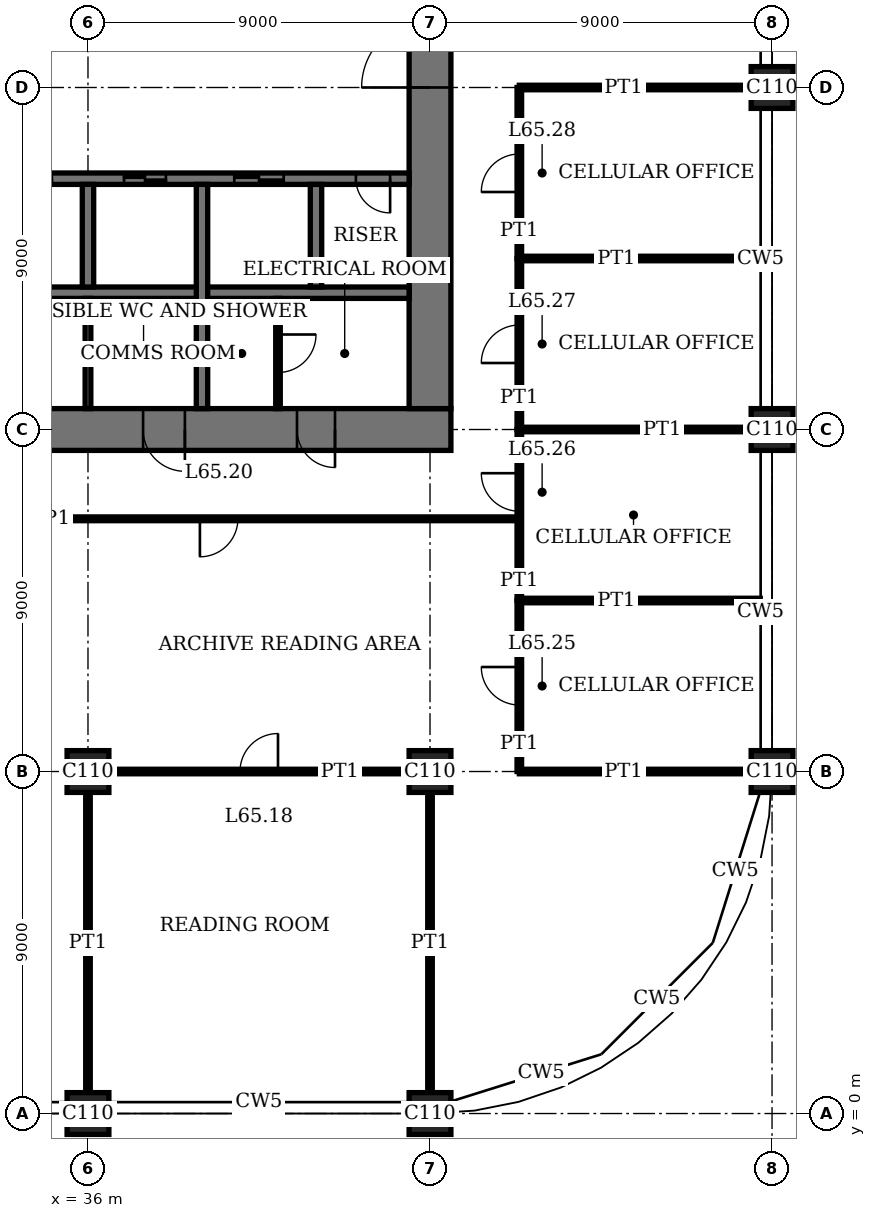
"""IFC4 building model, lengths in metres.
Left out: names, types, materials, properties, quantities, classifications, styles, units other than length and angle.
Written with IfcOpenShell. Run it as: python <this file> out.ifc"""

import sys

from ifc_helpers import new_model, si_unit, direction, frame, frame_2d, origin, origin_2d, place, context, subcontext, project, spatial, rectangle, extrude, element, fill, save


model = new_model("IFC4")
c1 = context("Model", 3, precision=1e-05, world=origin(), true_north=direction((0.0, 1.0)))
c2 = subcontext(c1, "Body", "Model", "MODEL_VIEW")
j1 = project(units=[si_unit("LENGTHUNIT", "METRE"), si_unit("PLANEANGLEUNIT", "RADIAN")], contexts=[c1])
p1 = place(None, origin())
s1 = spatial("IfcSite", under=j1, at=p1, CompositionType="ELEMENT")
p2 = place(p1, origin())
s2 = spatial("IfcBuilding", under=s1, at=p2, CompositionType="ELEMENT")
p3 = place(p2, frame((0.0, 0.0, 267.4)))
s3 = spatial("IfcBuildingStorey", under=s2, at=p3, CompositionType="ELEMENT", Elevation=267.4)
for number, where, z_axis, x_axis in (
    (1, (36.0, 0.0, 0.0), (0.0, 0.0, 1.0), (1.0, 0.0, 0.0)),
    (2, (36.0, 9.0, 0.0), (0.0, 0.0, 1.0), (1.0, 0.0, 0.0)),
    (3, (45.0, 0.0, 0.0), (0.0, 0.0, 1.0), (1.0, 0.0, 0.0)),
    (4, (45.0, 9.0, 0.0), (0.0, 0.0, 1.0), (1.0, 0.0, 0.0)),
    (5, (54.0, 9.0, 0.0), (0.0, 0.0, 1.0), (1.0, 0.0, 0.0)),
    (6, (54.0, 18.0, 0.0), (0.0, 0.0, 1.0), (1.0, 0.0, 0.0)),
    (7, (54.0, 27.0, 0.0), (0.0, 0.0, 1.0), (1.0, 0.0, 0.0)),
):
    element("IfcColumn", number, at=place(p3, frame(where, z_axis=z_axis, x_axis=x_axis)), inside=s3, PredefinedType="COLUMN", context=c2, shape_type="SweptSolid", body=[
        extrude(rectangle(XDim=1.1, YDim=1.1, at=origin_2d()), origin(), (0.0, 0.0, 1.0), 4.0),
    ])
p4 = place(p3, frame((17.45, 18.0, 0.0), z_axis=(0.0, 0.0, 1.0), x_axis=(1.0, 0.0, 0.0)))
e8 = element("IfcWall", 8, at=p4, inside=s3, PredefinedType="SHEAR", context=c2, shape_type="SweptSolid", body=[
    extrude(rectangle(XDim=28.1, YDim=1.1, at=frame_2d((14.05, 0.0))), origin(), (0.0, 0.0, 1.0), 4.0),
])
p5 = place(p4, frame((11.55, 0.0, 0.0)))
e9 = element("IfcOpeningElement", 9, at=p5, cuts=e8, PredefinedType="OPENING", context=c2, shape_type="SweptSolid", body=[
    extrude(rectangle(XDim=1.0, YDim=2.4, at=frame_2d((0.5, 1.2))), frame((0.0, 0.56, 0.0), z_axis=(0.0, -1.0, 0.0), x_axis=(1.0, 0.0, 0.0)), (0.0, 0.0, 1.0), 1.12),
])
p6 = place(p4, frame((16.55, 0.0, 0.0)))
e10 = element("IfcOpeningElement", 10, at=p6, cuts=e8, PredefinedType="OPENING", context=c2, shape_type="SweptSolid", body=[
    extrude(rectangle(XDim=1.0, YDim=2.4, at=frame_2d((0.5, 1.2))), frame((0.0, 0.56, 0.0), z_axis=(0.0, -1.0, 0.0), x_axis=(1.0, 0.0, 0.0)), (0.0, 0.0, 1.0), 1.12),
])
p7 = place(p4, frame((20.0, 0.0, 0.0)))
e11 = element("IfcOpeningElement", 11, at=p7, cuts=e8, PredefinedType="OPENING", context=c2, shape_type="SweptSolid", body=[
    extrude(rectangle(XDim=1.1, YDim=2.4, at=frame_2d((0.55, 1.2))), frame((0.0, 0.56, 0.0), z_axis=(0.0, -1.0, 0.0), x_axis=(1.0, 0.0, 0.0)), (0.0, 0.0, 1.0), 1.12),
])
p8 = place(p4, frame((24.05, 0.0, 0.0)))
e12 = element("IfcOpeningElement", 12, at=p8, cuts=e8, PredefinedType="OPENING", context=c2, shape_type="SweptSolid", body=[
    extrude(rectangle(XDim=1.0, YDim=2.4, at=frame_2d((0.5, 1.2))), frame((0.0, 0.56, 0.0), z_axis=(0.0, -1.0, 0.0), x_axis=(1.0, 0.0, 0.0)), (0.0, 0.0, 1.0), 1.12),
])
p9 = place(p3, frame((45.0, 18.55, 0.0), z_axis=(0.0, 0.0, 1.0), x_axis=(0.0, 1.0, 0.0)))
e13 = element("IfcWall", 13, at=p9, inside=s3, PredefinedType="SHEAR", context=c2, shape_type="SweptSolid", body=[
    extrude(rectangle(XDim=16.9, YDim=1.1, at=frame_2d((8.45, 0.0))), origin(), (0.0, 0.0, 1.0), 4.0),
])
p10 = place(p9, frame((8.45, 0.0, 0.0)))
e14 = element("IfcOpeningElement", 14, at=p10, cuts=e13, PredefinedType="OPENING", context=c2, shape_type="SweptSolid", body=[
    extrude(rectangle(XDim=1.8, YDim=2.4, at=frame_2d((0.9, 1.2))), frame((0.0, 0.56, 0.0), z_axis=(0.0, -1.0, 0.0), x_axis=(1.0, 0.0, 0.0)), (0.0, 0.0, 1.0), 1.12),
])
p11 = place(p3, frame((18.55, 24.6, 0.0), z_axis=(0.0, 0.0, 1.0), x_axis=(1.0, 0.0, 0.0)))
e15 = element("IfcWall", 15, at=p11, inside=s3, PredefinedType="SHEAR", context=c2, shape_type="SweptSolid", body=[
    extrude(rectangle(XDim=25.9, YDim=0.3, at=frame_2d((12.95, 0.0))), origin(), (0.0, 0.0, 1.0), 4.0),
])
p12 = place(p11, frame((4.95, 0.0, 0.0)))
e16 = element("IfcOpeningElement", 16, at=p12, cuts=e15, PredefinedType="OPENING", context=c2, shape_type="SweptSolid", body=[
    extrude(rectangle(XDim=1.0, YDim=2.4, at=frame_2d((0.5, 1.2))), frame((0.0, 0.16, 0.0), z_axis=(0.0, -1.0, 0.0), x_axis=(1.0, 0.0, 0.0)), (0.0, 0.0, 1.0), 0.32),
])
p13 = place(p11, frame((24.5, 0.0, 0.0)))
e17 = element("IfcOpeningElement", 17, at=p13, cuts=e15, PredefinedType="OPENING", context=c2, shape_type="SweptSolid", body=[
    extrude(rectangle(XDim=0.9, YDim=2.1, at=frame_2d((0.45, 1.05))), frame((0.0, 0.16, 0.0), z_axis=(0.0, -1.0, 0.0), x_axis=(1.0, 0.0, 0.0)), (0.0, 0.0, 1.0), 0.32),
])
p14 = place(p11, frame((9.4, 0.0, 0.0)))
e18 = element("IfcOpeningElement", 18, at=p14, cuts=e15, PredefinedType="OPENING", context=c2, shape_type="SweptSolid", body=[
    extrude(rectangle(XDim=1.1, YDim=2.4, at=frame_2d((0.55, 1.2))), frame((0.0, 0.16, 0.0), z_axis=(0.0, -1.0, 0.0), x_axis=(1.0, 0.0, 0.0)), (0.0, 0.0, 1.0), 0.32),
])
p15 = place(p11, frame((12.4, 0.0, 0.0)))
e19 = element("IfcOpeningElement", 19, at=p15, cuts=e15, PredefinedType="OPENING", context=c2, shape_type="SweptSolid", body=[
    extrude(rectangle(XDim=1.1, YDim=2.4, at=frame_2d((0.55, 1.2))), frame((0.0, 0.16, 0.0), z_axis=(0.0, -1.0, 0.0), x_axis=(1.0, 0.0, 0.0)), (0.0, 0.0, 1.0), 0.32),
])
p16 = place(p11, frame((15.4, 0.0, 0.0)))
e20 = element("IfcOpeningElement", 20, at=p16, cuts=e15, PredefinedType="OPENING", context=c2, shape_type="SweptSolid", body=[
    extrude(rectangle(XDim=1.1, YDim=2.4, at=frame_2d((0.55, 1.2))), frame((0.0, 0.16, 0.0), z_axis=(0.0, -1.0, 0.0), x_axis=(1.0, 0.0, 0.0)), (0.0, 0.0, 1.0), 0.32),
])
p17 = place(p11, frame((18.4, 0.0, 0.0)))
e21 = element("IfcOpeningElement", 21, at=p17, cuts=e15, PredefinedType="OPENING", context=c2, shape_type="SweptSolid", body=[
    extrude(rectangle(XDim=1.1, YDim=2.4, at=frame_2d((0.55, 1.2))), frame((0.0, 0.16, 0.0), z_axis=(0.0, -1.0, 0.0), x_axis=(1.0, 0.0, 0.0)), (0.0, 0.0, 1.0), 0.32),
])
p18 = place(p11, frame((21.3, 0.0, 0.0)))
e22 = element("IfcOpeningElement", 22, at=p18, cuts=e15, PredefinedType="OPENING", context=c2, shape_type="SweptSolid", body=[
    extrude(rectangle(XDim=1.3, YDim=2.4, at=frame_2d((0.65, 1.2))), frame((0.0, 0.16, 0.0), z_axis=(0.0, -1.0, 0.0), x_axis=(1.0, 0.0, 0.0)), (0.0, 0.0, 1.0), 0.32),
])
p19 = place(p3, frame((27.15, 21.6, 0.0), z_axis=(0.0, 0.0, 1.0), x_axis=(1.0, 0.0, 0.0)))
e23 = element("IfcWall", 23, at=p19, inside=s3, PredefinedType="SHEAR", context=c2, shape_type="SweptSolid", body=[
    extrude(rectangle(XDim=17.3, YDim=0.3, at=frame_2d((8.65, 0.0))), origin(), (0.0, 0.0, 1.0), 4.0),
])
p20 = place(p3, frame((36.0, 21.75, 0.0), z_axis=(0.0, 0.0, 1.0), x_axis=(0.0, 1.0, 0.0)))
e24 = element("IfcWall", 24, at=p20, inside=s3, PredefinedType="SHEAR", context=c2, shape_type="SweptSolid", body=[
    extrude(rectangle(XDim=2.7, YDim=0.3, at=frame_2d((1.35, 0.0))), origin(), (0.0, 0.0, 1.0), 4.0),
])
p21 = place(p3, frame((39.0, 18.55, 0.0), z_axis=(0.0, 0.0, 1.0), x_axis=(0.0, 1.0, 0.0)))
e25 = element("IfcWall", 25, at=p21, inside=s3, PredefinedType="SHEAR", context=c2, shape_type="SweptSolid", body=[
    extrude(rectangle(XDim=5.9, YDim=0.3, at=frame_2d((2.95, 0.0))), origin(), (0.0, 0.0, 1.0), 4.0),
])
p22 = place(p3, frame((42.0, 21.75, 0.0), z_axis=(0.0, 0.0, 1.0), x_axis=(0.0, 1.0, 0.0)))
e26 = element("IfcWall", 26, at=p22, inside=s3, PredefinedType="SHEAR", context=c2, shape_type="SweptSolid", body=[
    extrude(rectangle(XDim=2.7, YDim=0.3, at=frame_2d((1.35, 0.0))), origin(), (0.0, 0.0, 1.0), 4.0),
])
p23 = place(p3, frame((36.55, 9.0, 0.0), z_axis=(0.0, 0.0, 1.0), x_axis=(1.0, 0.0, 0.0)))
e27 = element("IfcWall", 27, at=p23, inside=s3, PredefinedType="PARTITIONING", context=c2, shape_type="SweptSolid", body=[
    extrude(rectangle(XDim=7.9, YDim=0.12, at=frame_2d((3.95, 0.0))), origin(), (0.0, 0.0, 1.0), 3.05),
])
p24 = place(p23, frame((3.45, 0.0, 0.0)))
e28 = element("IfcOpeningElement", 28, at=p24, cuts=e27, PredefinedType="OPENING", context=c2, shape_type="SweptSolid", body=[
    extrude(rectangle(XDim=1.0, YDim=2.4, at=frame_2d((0.5, 1.2))), frame((0.0, 0.07, 0.0), z_axis=(0.0, -1.0, 0.0), x_axis=(1.0, 0.0, 0.0)), (0.0, 0.0, 1.0), 0.14),
])
p25 = place(p3, frame((47.35, 9.0, 0.0), z_axis=(0.0, 0.0, 1.0), x_axis=(1.0, 0.0, 0.0)))
e29 = element("IfcWall", 29, at=p25, inside=s3, PredefinedType="PARTITIONING", context=c2, shape_type="SweptSolid", body=[
    extrude(rectangle(XDim=6.1, YDim=0.12, at=frame_2d((3.05, 0.0))), origin(), (0.0, 0.0, 1.0), 3.05),
])
p26 = place(p3, frame((47.35, 13.5, 0.0), z_axis=(0.0, 0.0, 1.0), x_axis=(1.0, 0.0, 0.0)))
e30 = element("IfcWall", 30, at=p26, inside=s3, PredefinedType="PARTITIONING", context=c2, shape_type="SweptSolid", body=[
    extrude(rectangle(XDim=6.34, YDim=0.12, at=frame_2d((3.17, 0.0))), origin(), (0.0, 0.0, 1.0), 3.1),
])
p27 = place(p3, frame((31.55, 15.65, 0.0), z_axis=(0.0, 0.0, 1.0), x_axis=(1.0, 0.0, 0.0)))
e31 = element("IfcWall", 31, at=p27, inside=s3, PredefinedType="PARTITIONING", context=c2, shape_type="SweptSolid", body=[
    extrude(rectangle(XDim=15.79, YDim=0.1, at=frame_2d((7.895, 0.0))), origin(), (0.0, 0.0, 1.0), 3.75),
])
p28 = place(p27, frame((7.395, 0.0, 0.0)))
e32 = element("IfcOpeningElement", 32, at=p28, cuts=e31, PredefinedType="OPENING", context=c2, shape_type="SweptSolid", body=[
    extrude(rectangle(XDim=1.0, YDim=2.4, at=frame_2d((0.5, 1.2))), frame((0.0, 0.06, 0.0), z_axis=(0.0, -1.0, 0.0), x_axis=(1.0, 0.0, 0.0)), (0.0, 0.0, 1.0), 0.12),
])
p29 = place(p3, frame((47.35, 18.0, 0.0), z_axis=(0.0, 0.0, 1.0), x_axis=(1.0, 0.0, 0.0)))
e33 = element("IfcWall", 33, at=p29, inside=s3, PredefinedType="PARTITIONING", context=c2, shape_type="SweptSolid", body=[
    extrude(rectangle(XDim=6.1, YDim=0.12, at=frame_2d((3.05, 0.0))), origin(), (0.0, 0.0, 1.0), 3.05),
])
p30 = place(p3, frame((47.35, 22.5, 0.0), z_axis=(0.0, 0.0, 1.0), x_axis=(1.0, 0.0, 0.0)))
e34 = element("IfcWall", 34, at=p30, inside=s3, PredefinedType="PARTITIONING", context=c2, shape_type="SweptSolid", body=[
    extrude(rectangle(XDim=6.34, YDim=0.12, at=frame_2d((3.17, 0.0))), origin(), (0.0, 0.0, 1.0), 3.1),
])
p31 = place(p3, frame((47.35, 27.0, 0.0), z_axis=(0.0, 0.0, 1.0), x_axis=(1.0, 0.0, 0.0)))
e35 = element("IfcWall", 35, at=p31, inside=s3, PredefinedType="PARTITIONING", context=c2, shape_type="SweptSolid", body=[
    extrude(rectangle(XDim=6.1, YDim=0.12, at=frame_2d((3.05, 0.0))), origin(), (0.0, 0.0, 1.0), 3.05),
])
for number, where, z_axis, x_axis in (
    (36, (36.0, 0.55, 0.0), (0.0, 0.0, 1.0), (0.0, 1.0, 0.0)),
    (37, (45.0, 0.55, 0.0), (0.0, 0.0, 1.0), (0.0, 1.0, 0.0)),
):
    element("IfcWall", number, at=place(p3, frame(where, z_axis=z_axis, x_axis=x_axis)), inside=s3, PredefinedType="PARTITIONING", context=c2, shape_type="SweptSolid", body=[
        extrude(rectangle(XDim=7.9, YDim=0.12, at=frame_2d((3.95, 0.0))), origin(), (0.0, 0.0, 1.0), 3.05),
    ])
p32 = place(p3, frame((47.35, 9.0, 0.0), z_axis=(0.0, 0.0, 1.0), x_axis=(0.0, 1.0, 0.0)))
e38 = element("IfcWall", 38, at=p32, inside=s3, PredefinedType="PARTITIONING", context=c2, shape_type="SweptSolid", body=[
    extrude(rectangle(XDim=4.5, YDim=0.12, at=frame_2d((2.25, 0.0))), origin(), (0.0, 0.0, 1.0), 3.75),
])
p33 = place(p32, frame((1.75, 0.0, 0.0)))
e39 = element("IfcOpeningElement", 39, at=p33, cuts=e38, PredefinedType="OPENING", context=c2, shape_type="SweptSolid", body=[
    extrude(rectangle(XDim=1.0, YDim=2.4, at=frame_2d((0.5, 1.2))), frame((0.0, 0.07, 0.0), z_axis=(0.0, -1.0, 0.0), x_axis=(1.0, 0.0, 0.0)), (0.0, 0.0, 1.0), 0.14),
])
p34 = place(p3, frame((47.35, 13.5, 0.0), z_axis=(0.0, 0.0, 1.0), x_axis=(0.0, 1.0, 0.0)))
e40 = element("IfcWall", 40, at=p34, inside=s3, PredefinedType="PARTITIONING", context=c2, shape_type="SweptSolid", body=[
    extrude(rectangle(XDim=4.5, YDim=0.12, at=frame_2d((2.25, 0.0))), origin(), (0.0, 0.0, 1.0), 3.75),
])
p35 = place(p34, frame((2.35, 0.0, 0.0)))
e41 = element("IfcOpeningElement", 41, at=p35, cuts=e40, PredefinedType="OPENING", context=c2, shape_type="SweptSolid", body=[
    extrude(rectangle(XDim=1.0, YDim=2.4, at=frame_2d((0.5, 1.2))), frame((0.0, 0.07, 0.0), z_axis=(0.0, -1.0, 0.0), x_axis=(1.0, 0.0, 0.0)), (0.0, 0.0, 1.0), 0.14),
])
p36 = place(p3, frame((47.35, 18.0, 0.0), z_axis=(0.0, 0.0, 1.0), x_axis=(0.0, 1.0, 0.0)))
e42 = element("IfcWall", 42, at=p36, inside=s3, PredefinedType="PARTITIONING", context=c2, shape_type="SweptSolid", body=[
    extrude(rectangle(XDim=4.5, YDim=0.12, at=frame_2d((2.25, 0.0))), origin(), (0.0, 0.0, 1.0), 3.75),
])
p37 = place(p36, frame((1.75, 0.0, 0.0)))
e43 = element("IfcOpeningElement", 43, at=p37, cuts=e42, PredefinedType="OPENING", context=c2, shape_type="SweptSolid", body=[
    extrude(rectangle(XDim=1.0, YDim=2.4, at=frame_2d((0.5, 1.2))), frame((0.0, 0.07, 0.0), z_axis=(0.0, -1.0, 0.0), x_axis=(1.0, 0.0, 0.0)), (0.0, 0.0, 1.0), 0.14),
])
p38 = place(p3, frame((47.35, 22.5, 0.0), z_axis=(0.0, 0.0, 1.0), x_axis=(0.0, 1.0, 0.0)))
e44 = element("IfcWall", 44, at=p38, inside=s3, PredefinedType="PARTITIONING", context=c2, shape_type="SweptSolid", body=[
    extrude(rectangle(XDim=4.5, YDim=0.12, at=frame_2d((2.25, 0.0))), origin(), (0.0, 0.0, 1.0), 3.75),
])
p39 = place(p38, frame((1.75, 0.0, 0.0)))
e45 = element("IfcOpeningElement", 45, at=p39, cuts=e44, PredefinedType="OPENING", context=c2, shape_type="SweptSolid", body=[
    extrude(rectangle(XDim=1.0, YDim=2.4, at=frame_2d((0.5, 1.2))), frame((0.0, 0.07, 0.0), z_axis=(0.0, -1.0, 0.0), x_axis=(1.0, 0.0, 0.0)), (0.0, 0.0, 1.0), 0.14),
])
p40 = place(p3, frame((36.0, 18.55, 0.0), z_axis=(0.0, 0.0, 1.0), x_axis=(0.0, 1.0, 0.0)))
e46 = element("IfcWall", 46, at=p40, inside=s3, PredefinedType="PARTITIONING", context=c2, shape_type="SweptSolid", body=[
    extrude(rectangle(XDim=2.9, YDim=0.15, at=frame_2d((1.45, 0.0))), origin(), (0.0, 0.0, 1.0), 3.75),
])
p41 = place(p3, frame((41.0, 18.55, 0.0), z_axis=(0.0, 0.0, 1.0), x_axis=(0.0, 1.0, 0.0)))
e47 = element("IfcWall", 47, at=p41, inside=s3, PredefinedType="PARTITIONING", context=c2, shape_type="SweptSolid", body=[
    extrude(rectangle(XDim=2.9, YDim=0.12, at=frame_2d((1.45, 0.0))), origin(), (0.0, 0.0, 1.0), 3.75),
])
p42 = place(p41, frame((0.95, 0.0, 0.0)))
e48 = element("IfcOpeningElement", 48, at=p42, cuts=e47, PredefinedType="OPENING", context=c2, shape_type="SweptSolid", body=[
    extrude(rectangle(XDim=1.0, YDim=2.4, at=frame_2d((0.5, 1.2))), frame((0.0, 0.07, 0.0), z_axis=(0.0, -1.0, 0.0), x_axis=(1.0, 0.0, 0.0)), (0.0, 0.0, 1.0), 0.14),
])
p43 = place(p10, origin())
e49 = element("IfcDoor", 49, at=p43, inside=s3, OperationType="DOUBLE_DOOR_DOUBLE_SWING", PredefinedType="DOOR", context=c2, shape_type="SweptSolid", body=[
    extrude(rectangle(XDim=1.8, YDim=2.4, at=frame_2d((0.9, 1.2))), frame((0.0, 0.03, 0.0), z_axis=(0.0, -1.0, 0.0), x_axis=(1.0, 0.0, 0.0)), (0.0, 0.0, 1.0), 0.06),
    extrude(rectangle(XDim=0.04, YDim=2.4, at=frame_2d((0.02, 1.2))), frame((0.0, 0.55, 0.0), z_axis=(0.0, -1.0, 0.0), x_axis=(1.0, 0.0, 0.0)), (0.0, 0.0, 1.0), 1.1),
    extrude(rectangle(XDim=0.04, YDim=2.4, at=frame_2d((1.78, 1.2))), frame((0.0, 0.55, 0.0), z_axis=(0.0, -1.0, 0.0), x_axis=(1.0, 0.0, 0.0)), (0.0, 0.0, 1.0), 1.1),
    extrude(rectangle(XDim=1.8, YDim=0.04, at=frame_2d((0.9, 2.38))), frame((0.0, 0.55, 0.0), z_axis=(0.0, -1.0, 0.0), x_axis=(1.0, 0.0, 0.0)), (0.0, 0.0, 1.0), 1.1),
])
fill(e14, e49)
p44 = place(p7, origin())
e50 = element("IfcDoor", 50, at=p44, inside=s3, OperationType="SINGLE_SWING_RIGHT", PredefinedType="DOOR", context=c2, shape_type="SweptSolid", body=[
    extrude(rectangle(XDim=1.1, YDim=2.4, at=frame_2d((0.55, 1.2))), frame((0.0, 0.025, 0.0), z_axis=(0.0, -1.0, 0.0), x_axis=(1.0, 0.0, 0.0)), (0.0, 0.0, 1.0), 0.05),
    extrude(rectangle(XDim=0.04, YDim=2.4, at=frame_2d((0.02, 1.2))), frame((0.0, 0.44, 0.0), z_axis=(0.0, -1.0, 0.0), x_axis=(1.0, 0.0, 0.0)), (0.0, 0.0, 1.0), 0.88),
    extrude(rectangle(XDim=0.04, YDim=2.4, at=frame_2d((1.08, 1.2))), frame((0.0, 0.44, 0.0), z_axis=(0.0, -1.0, 0.0), x_axis=(1.0, 0.0, 0.0)), (0.0, 0.0, 1.0), 0.88),
    extrude(rectangle(XDim=1.1, YDim=0.04, at=frame_2d((0.55, 2.38))), frame((0.0, 0.44, 0.0), z_axis=(0.0, -1.0, 0.0), x_axis=(1.0, 0.0, 0.0)), (0.0, 0.0, 1.0), 0.88),
])
fill(e11, e50)
p45 = place(p8, origin())
e51 = element("IfcDoor", 51, at=p45, inside=s3, OperationType="SINGLE_SWING_RIGHT", PredefinedType="DOOR", context=c2, shape_type="SweptSolid", body=[
    extrude(rectangle(XDim=1.0, YDim=2.4, at=frame_2d((0.5, 1.2))), frame((0.0, 0.025, 0.0), z_axis=(0.0, -1.0, 0.0), x_axis=(1.0, 0.0, 0.0)), (0.0, 0.0, 1.0), 0.05),
    extrude(rectangle(XDim=0.04, YDim=2.4, at=frame_2d((0.02, 1.2))), frame((0.0, 0.4, 0.0), z_axis=(0.0, -1.0, 0.0), x_axis=(1.0, 0.0, 0.0)), (0.0, 0.0, 1.0), 0.8),
    extrude(rectangle(XDim=0.04, YDim=2.4, at=frame_2d((0.98, 1.2))), frame((0.0, 0.4, 0.0), z_axis=(0.0, -1.0, 0.0), x_axis=(1.0, 0.0, 0.0)), (0.0, 0.0, 1.0), 0.8),
    extrude(rectangle(XDim=1.0, YDim=0.04, at=frame_2d((0.5, 2.38))), frame((0.0, 0.4, 0.0), z_axis=(0.0, -1.0, 0.0), x_axis=(1.0, 0.0, 0.0)), (0.0, 0.0, 1.0), 0.8),
])
fill(e12, e51)
p46 = place(p13, origin())
e52 = element("IfcDoor", 52, at=p46, inside=s3, OperationType="SINGLE_SWING_RIGHT", PredefinedType="DOOR", context=c2, shape_type="SweptSolid", body=[
    extrude(rectangle(XDim=0.9, YDim=2.1, at=frame_2d((0.45, 1.05))), frame((0.0, 0.03, 0.0), z_axis=(0.0, -1.0, 0.0), x_axis=(1.0, 0.0, 0.0)), (0.0, 0.0, 1.0), 0.06),
])
fill(e17, e52)
p47 = place(p24, origin())
e53 = element("IfcDoor", 53, at=p47, inside=s3, OperationType="SINGLE_SWING_LEFT", PredefinedType="DOOR", context=c2, shape_type="SweptSolid", body=[
    extrude(rectangle(XDim=1.0, YDim=2.4, at=frame_2d((0.5, 1.2))), frame((0.0, 0.025, 0.0), z_axis=(0.0, -1.0, 0.0), x_axis=(1.0, 0.0, 0.0)), (0.0, 0.0, 1.0), 0.05),
])
fill(e28, e53)
p48 = place(p28, origin())
e54 = element("IfcDoor", 54, at=p48, inside=s3, OperationType="SINGLE_SWING_LEFT", PredefinedType="DOOR", context=c2, shape_type="SweptSolid", body=[
    extrude(rectangle(XDim=1.0, YDim=2.4, at=frame_2d((0.5, 1.2))), frame((0.0, 0.02, 0.0), z_axis=(0.0, -1.0, 0.0), x_axis=(1.0, 0.0, 0.0)), (0.0, 0.0, 1.0), 0.04),
])
fill(e32, e54)
p49 = place(p33, origin())
e55 = element("IfcDoor", 55, at=p49, inside=s3, OperationType="SINGLE_SWING_LEFT", PredefinedType="DOOR", context=c2, shape_type="SweptSolid", body=[
    extrude(rectangle(XDim=1.0, YDim=2.4, at=frame_2d((0.5, 1.2))), frame((0.0, 0.025, 0.0), z_axis=(0.0, -1.0, 0.0), x_axis=(1.0, 0.0, 0.0)), (0.0, 0.0, 1.0), 0.05),
])
fill(e39, e55)
p50 = place(p35, origin())
e56 = element("IfcDoor", 56, at=p50, inside=s3, OperationType="SINGLE_SWING_LEFT", PredefinedType="DOOR", context=c2, shape_type="SweptSolid", body=[
    extrude(rectangle(XDim=1.0, YDim=2.4, at=frame_2d((0.5, 1.2))), frame((0.0, 0.025, 0.0), z_axis=(0.0, -1.0, 0.0), x_axis=(1.0, 0.0, 0.0)), (0.0, 0.0, 1.0), 0.05),
])
fill(e41, e56)
p51 = place(p37, origin())
e57 = element("IfcDoor", 57, at=p51, inside=s3, OperationType="SINGLE_SWING_RIGHT", PredefinedType="DOOR", context=c2, shape_type="SweptSolid", body=[
    extrude(rectangle(XDim=1.0, YDim=2.4, at=frame_2d((0.5, 1.2))), frame((0.0, 0.025, 0.0), z_axis=(0.0, -1.0, 0.0), x_axis=(1.0, 0.0, 0.0)), (0.0, 0.0, 1.0), 0.05),
])
fill(e43, e57)
p52 = place(p39, origin())
e58 = element("IfcDoor", 58, at=p52, inside=s3, OperationType="SINGLE_SWING_RIGHT", PredefinedType="DOOR", context=c2, shape_type="SweptSolid", body=[
    extrude(rectangle(XDim=1.0, YDim=2.4, at=frame_2d((0.5, 1.2))), frame((0.0, 0.025, 0.0), z_axis=(0.0, -1.0, 0.0), x_axis=(1.0, 0.0, 0.0)), (0.0, 0.0, 1.0), 0.05),
])
fill(e45, e58)
p53 = place(p42, origin())
e59 = element("IfcDoor", 59, at=p53, inside=s3, OperationType="SINGLE_SWING_RIGHT", PredefinedType="DOOR", context=c2, shape_type="SweptSolid", body=[
    extrude(rectangle(XDim=1.0, YDim=2.4, at=frame_2d((0.5, 1.2))), frame((0.0, 0.03, 0.0), z_axis=(0.0, -1.0, 0.0), x_axis=(1.0, 0.0, 0.0)), (0.0, 0.0, 1.0), 0.06),
])
fill(e48, e59)
p54 = place(p17, origin())
e60 = element("IfcDoor", 60, at=p54, inside=s3, OperationType="DOUBLE_DOOR_SLIDING", PredefinedType="DOOR", context=c2, shape_type="SweptSolid", body=[
    extrude(rectangle(XDim=1.1, YDim=2.4, at=frame_2d((0.55, 1.2))), frame((0.0, 0.02, 0.0), z_axis=(0.0, -1.0, 0.0), x_axis=(1.0, 0.0, 0.0)), (0.0, 0.0, 1.0), 0.04),
])
fill(e21, e60)
p55 = place(p18, origin())
e61 = element("IfcDoor", 61, at=p55, inside=s3, OperationType="DOUBLE_DOOR_SLIDING", PredefinedType="DOOR", context=c2, shape_type="SweptSolid", body=[
    extrude(rectangle(XDim=1.3, YDim=2.4, at=frame_2d((0.65, 1.2))), frame((0.0, 0.02, 0.0), z_axis=(0.0, -1.0, 0.0), x_axis=(1.0, 0.0, 0.0)), (0.0, 0.0, 1.0), 0.04),
])
fill(e22, e61)
save(model, sys.argv[1])
